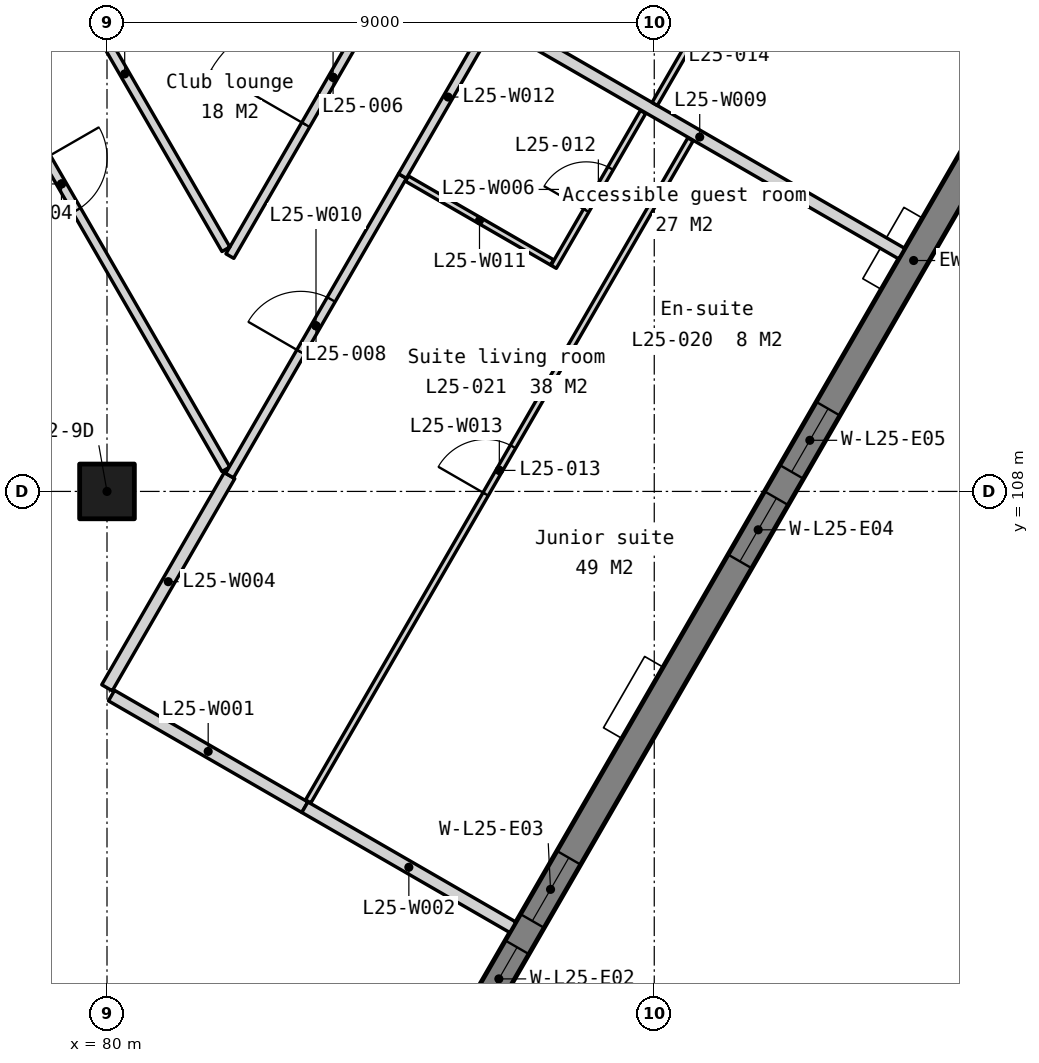
"""IFC4 building model, lengths in metres.
Left out: names, types, materials, properties, quantities, classifications, styles, units other than length and angle.
Written with IfcOpenShell. Run it as: python <this file> out.ifc"""

import sys

from ifc_helpers import new_model, si_unit, direction, frame, frame_2d, origin, origin_2d, place, context, subcontext, project, spatial, polyline, rectangle, outline, extrude, element, fill, save


model = new_model("IFC4")
c1 = context("Model", 3, precision=1e-05, world=origin(), true_north=direction((0.0, 1.0)))
c2 = subcontext(c1, "Body", "Model", "MODEL_VIEW")
j1 = project(units=[si_unit("LENGTHUNIT", "METRE"), si_unit("PLANEANGLEUNIT", "RADIAN")], contexts=[c1])
p1 = place(None, origin())
s1 = spatial("IfcSite", under=j1, at=p1, CompositionType="ELEMENT")
p2 = place(p1, origin())
s2 = spatial("IfcBuilding", under=s1, at=p2, CompositionType="ELEMENT")
p3 = place(p2, frame((0.0, 0.0, 102.8)))
s3 = spatial("IfcBuildingStorey", under=s2, at=p3, CompositionType="ELEMENT", Elevation=102.8)
p4 = place(p3, frame((80.0, 108.0, 0.0), z_axis=(0.0, 0.0, 1.0), x_axis=(1.0, 0.0, 0.0)))
e1 = element("IfcColumn", 1, at=p4, inside=s3, PredefinedType="COLUMN", context=c2, shape_type="SweptSolid", body=[
    extrude(rectangle(XDim=0.9, YDim=0.9, at=origin_2d()), origin(), (0.0, 0.0, 1.0), 3.5),
])
p5 = place(p3, frame((82.605, 93.333, -0.15), z_axis=(0.0, 0.0, 1.0), x_axis=(0.500000478905, 0.866025127289, 0.0)))
e2 = element("IfcWall", 2, at=p5, inside=s3, PredefinedType="SOLIDWALL", context=c2, shape_type="SweptSolid", body=[
    extrude(outline(polyline([(42.643, 0.0), (42.643, 3.5), (0.0, 3.5), (0.0, 0.0), (42.643, 0.0)])), frame((0.0, 0.225, 0.0), z_axis=(0.0, -1.0, 0.0), x_axis=(1.0, 0.0, 0.0)), (0.0, 0.0, 1.0), 0.45),
])
p6 = place(p5, frame((0.72, 0.0, 1.05)))
e3 = element("IfcOpeningElement", 3, at=p6, cuts=e2, PredefinedType="OPENING", context=c2, shape_type="SweptSolid", body=[
    extrude(rectangle(XDim=1.2, YDim=1.5, at=frame_2d((0.6, 0.75))), frame((0.0, 0.235, 0.0), z_axis=(0.0, -1.0, 0.0), x_axis=(1.0, 0.0, 0.0)), (0.0, 0.0, 1.0), 0.47),
])
p7 = place(p5, frame((7.079, 0.0, 1.05)))
e4 = element("IfcOpeningElement", 4, at=p7, cuts=e2, PredefinedType="OPENING", context=c2, shape_type="SweptSolid", body=[
    extrude(rectangle(XDim=1.2, YDim=1.5, at=frame_2d((0.6, 0.75))), frame((0.0, 0.235, 0.0), z_axis=(0.0, -1.0, 0.0), x_axis=(1.0, 0.0, 0.0)), (0.0, 0.0, 1.0), 0.47),
])
p8 = place(p5, frame((8.779, 0.0, 1.05)))
e5 = element("IfcOpeningElement", 5, at=p8, cuts=e2, PredefinedType="OPENING", context=c2, shape_type="SweptSolid", body=[
    extrude(rectangle(XDim=1.2, YDim=1.5, at=frame_2d((0.6, 0.75))), frame((0.0, 0.235, 0.0), z_axis=(0.0, -1.0, 0.0), x_axis=(1.0, 0.0, 0.0)), (0.0, 0.0, 1.0), 0.47),
])
p9 = place(p5, frame((15.607, 0.0, 1.05)))
e6 = element("IfcOpeningElement", 6, at=p9, cuts=e2, PredefinedType="OPENING", context=c2, shape_type="SweptSolid", body=[
    extrude(rectangle(XDim=1.2, YDim=1.5, at=frame_2d((0.6, 0.75))), frame((0.0, 0.235, 0.0), z_axis=(0.0, -1.0, 0.0), x_axis=(1.0, 0.0, 0.0)), (0.0, 0.0, 1.0), 0.47),
])
p10 = place(p5, frame((17.307, 0.0, 1.05)))
e7 = element("IfcOpeningElement", 7, at=p10, cuts=e2, PredefinedType="OPENING", context=c2, shape_type="SweptSolid", body=[
    extrude(rectangle(XDim=1.2, YDim=1.5, at=frame_2d((0.6, 0.75))), frame((0.0, 0.235, 0.0), z_axis=(0.0, -1.0, 0.0), x_axis=(1.0, 0.0, 0.0)), (0.0, 0.0, 1.0), 0.47),
])
p11 = place(p5, frame((24.136, 0.0, 1.05)))
e8 = element("IfcOpeningElement", 8, at=p11, cuts=e2, PredefinedType="OPENING", context=c2, shape_type="SweptSolid", body=[
    extrude(rectangle(XDim=1.2, YDim=1.5, at=frame_2d((0.6, 0.75))), frame((0.0, 0.235, 0.0), z_axis=(0.0, -1.0, 0.0), x_axis=(1.0, 0.0, 0.0)), (0.0, 0.0, 1.0), 0.47),
])
p12 = place(p5, frame((25.836, 0.0, 1.05)))
e9 = element("IfcOpeningElement", 9, at=p12, cuts=e2, PredefinedType="OPENING", context=c2, shape_type="SweptSolid", body=[
    extrude(rectangle(XDim=1.2, YDim=1.5, at=frame_2d((0.6, 0.75))), frame((0.0, 0.235, 0.0), z_axis=(0.0, -1.0, 0.0), x_axis=(1.0, 0.0, 0.0)), (0.0, 0.0, 1.0), 0.47),
])
p13 = place(p5, frame((32.665, 0.0, 1.05)))
e10 = element("IfcOpeningElement", 10, at=p13, cuts=e2, PredefinedType="OPENING", context=c2, shape_type="SweptSolid", body=[
    extrude(rectangle(XDim=1.2, YDim=1.5, at=frame_2d((0.6, 0.75))), frame((0.0, 0.235, 0.0), z_axis=(0.0, -1.0, 0.0), x_axis=(1.0, 0.0, 0.0)), (0.0, 0.0, 1.0), 0.47),
])
p14 = place(p5, frame((34.365, 0.0, 1.05)))
e11 = element("IfcOpeningElement", 11, at=p14, cuts=e2, PredefinedType="OPENING", context=c2, shape_type="SweptSolid", body=[
    extrude(rectangle(XDim=1.2, YDim=1.5, at=frame_2d((0.6, 0.75))), frame((0.0, 0.235, 0.0), z_axis=(0.0, -1.0, 0.0), x_axis=(1.0, 0.0, 0.0)), (0.0, 0.0, 1.0), 0.47),
])
p15 = place(p5, frame((40.722, 0.0, 1.05)))
e12 = element("IfcOpeningElement", 12, at=p15, cuts=e2, PredefinedType="OPENING", context=c2, shape_type="SweptSolid", body=[
    extrude(rectangle(XDim=1.2, YDim=1.5, at=frame_2d((0.6, 0.75))), frame((0.0, 0.235, 0.0), z_axis=(0.0, -1.0, 0.0), x_axis=(1.0, 0.0, 0.0)), (0.0, 0.0, 1.0), 0.47),
])
p16 = place(p3, frame((80.074, 104.642, 0.0), z_axis=(0.0, 0.0, 1.0), x_axis=(0.866008413041, -0.500029427677, 0.0)))
e13 = element("IfcWall", 13, at=p16, inside=s3, PredefinedType="PARTITIONING", context=c2, shape_type="SweptSolid", body=[
    extrude(rectangle(XDim=3.672, YDim=0.2, at=frame_2d((1.836, 0.0))), origin(), (0.0, 0.0, 1.0), 3.35),
])
p17 = place(p3, frame((83.254, 102.806, 0.0), z_axis=(0.0, 0.0, 1.0), x_axis=(0.866032218625, -0.499988196164, 0.0)))
e14 = element("IfcWall", 14, at=p17, inside=s3, PredefinedType="PARTITIONING", context=c2, shape_type="SweptSolid", body=[
    extrude(rectangle(XDim=3.95, YDim=0.2, at=frame_2d((1.975, 0.0))), origin(), (0.0, 0.0, 1.0), 3.35),
])
p18 = place(p3, frame((80.0, 104.771, 0.0), z_axis=(0.0, 0.0, 1.0), x_axis=(0.499989908473, 0.866031230052, 0.0)))
e15 = element("IfcWall", 15, at=p18, inside=s3, PredefinedType="PARTITIONING", context=c2, shape_type="SweptSolid", body=[
    extrude(rectangle(XDim=4.03, YDim=0.2, at=frame_2d((2.015, 0.0))), origin(), (0.0, 0.0, 1.0), 3.35),
])
p19 = place(p3, frame((76.548, 117.75, 0.0), z_axis=(0.0, 0.0, 1.0), x_axis=(0.499203981413, -0.866484497808, 0.0)))
e16 = element("IfcWall", 16, at=p19, inside=s3, PredefinedType="PARTITIONING", context=c2, shape_type="SweptSolid", body=[
    extrude(rectangle(XDim=10.832, YDim=0.15, at=frame_2d((5.416, 0.0))), origin(), (0.0, 0.0, 1.0), 3.35),
])
p20 = place(p19, frame((4.916, 0.0, 0.0)))
e17 = element("IfcOpeningElement", 17, at=p20, cuts=e16, PredefinedType="OPENING", context=c2, shape_type="SweptSolid", body=[
    extrude(rectangle(XDim=1.0, YDim=2.1, at=frame_2d((0.5, 1.05))), frame((0.0, 0.085, 0.0), z_axis=(0.0, -1.0, 0.0), x_axis=(1.0, 0.0, 0.0)), (0.0, 0.0, 1.0), 0.17),
])
p21 = place(p3, frame((87.346, 111.694, 0.0), z_axis=(0.0, 0.0, 1.0), x_axis=(0.499988418424, 0.866032090307, 0.0)))
e18 = element("IfcWall", 18, at=p21, inside=s3, PredefinedType="PARTITIONING", context=c2, shape_type="SweptSolid", body=[
    extrude(rectangle(XDim=2.94, YDim=0.1, at=frame_2d((1.47, 0.0))), origin(), (0.0, 0.0, 1.0), 3.35),
])
p22 = place(p21, frame((1.07, 0.0, 0.0)))
e19 = element("IfcOpeningElement", 19, at=p22, cuts=e18, PredefinedType="OPENING", context=c2, shape_type="SweptSolid", body=[
    extrude(rectangle(XDim=0.8, YDim=2.1, at=frame_2d((0.4, 1.05))), frame((0.0, 0.06, 0.0), z_axis=(0.0, -1.0, 0.0), x_axis=(1.0, 0.0, 0.0)), (0.0, 0.0, 1.0), 0.12),
])
p23 = place(p3, frame((82.021, 111.871, 0.0), z_axis=(0.0, 0.0, 1.0), x_axis=(0.500006764785, 0.866021498099, 0.0)))
e20 = element("IfcWall", 20, at=p23, inside=s3, PredefinedType="PARTITIONING", context=c2, shape_type="SweptSolid", body=[
    extrude(rectangle(XDim=6.789, YDim=0.15, at=frame_2d((3.395, 0.0))), origin(), (0.0, 0.0, 1.0), 3.35),
])
p24 = place(p23, frame((2.495, 0.0, 0.0)))
e21 = element("IfcOpeningElement", 21, at=p24, cuts=e20, PredefinedType="OPENING", context=c2, shape_type="SweptSolid", body=[
    extrude(rectangle(XDim=1.8, YDim=2.1, at=frame_2d((0.9, 1.05))), frame((0.0, 0.085, 0.0), z_axis=(0.0, -1.0, 0.0), x_axis=(1.0, 0.0, 0.0)), (0.0, 0.0, 1.0), 0.17),
])
p25 = place(p3, frame((86.424, 115.748, 0.0), z_axis=(0.0, 0.0, 1.0), x_axis=(0.866016603171, -0.5000152428, 0.0)))
e22 = element("IfcWall", 22, at=p25, inside=s3, PredefinedType="PARTITIONING", context=c2, shape_type="SweptSolid", body=[
    extrude(rectangle(XDim=7.675, YDim=0.2, at=frame_2d((3.837, 0.0))), origin(), (0.0, 0.0, 1.0), 3.35),
])
p26 = place(p3, frame((82.015, 108.26, 0.0), z_axis=(0.0, 0.0, 1.0), x_axis=(0.500002303494, 0.866024073857, 0.0)))
e23 = element("IfcWall", 23, at=p26, inside=s3, PredefinedType="PARTITIONING", context=c2, shape_type="SweptSolid", body=[
    extrude(rectangle(XDim=5.689, YDim=0.15, at=frame_2d((2.844, 0.0))), origin(), (0.0, 0.0, 1.0), 3.35),
])
p27 = place(p26, frame((2.344, 0.0, 0.0)))
e24 = element("IfcOpeningElement", 24, at=p27, cuts=e23, PredefinedType="OPENING", context=c2, shape_type="SweptSolid", body=[
    extrude(rectangle(XDim=1.0, YDim=2.1, at=frame_2d((0.5, 1.05))), frame((0.0, 0.085, 0.0), z_axis=(0.0, -1.0, 0.0), x_axis=(1.0, 0.0, 0.0)), (0.0, 0.0, 1.0), 0.17),
])
p28 = place(p3, frame((84.933, 113.145, 0.0), z_axis=(0.0, 0.0, 1.0), x_axis=(0.866004076171, -0.500036938691, 0.0)))
e25 = element("IfcWall", 25, at=p28, inside=s3, PredefinedType="PARTITIONING", context=c2, shape_type="SweptSolid", body=[
    extrude(rectangle(XDim=2.755, YDim=0.1, at=frame_2d((1.377, 0.0))), origin(), (0.0, 0.0, 1.0), 3.35),
])
p29 = place(p3, frame((84.859, 113.187, 0.0), z_axis=(0.0, 0.0, 1.0), x_axis=(0.50002537861, 0.866010750942, 0.0)))
e26 = element("IfcWall", 26, at=p29, inside=s3, PredefinedType="PARTITIONING", context=c2, shape_type="SweptSolid", body=[
    extrude(rectangle(XDim=3.0, YDim=0.15, at=frame_2d((1.5, 0.0))), origin(), (0.0, 0.0, 1.0), 3.35),
])
p30 = place(p3, frame((83.309, 102.902, 0.0), z_axis=(0.0, 0.0, 1.0), x_axis=(0.499996436937, 0.86602746091, 0.0)))
e27 = element("IfcWall", 27, at=p30, inside=s3, PredefinedType="PARTITIONING", context=c2, shape_type="SweptSolid", body=[
    extrude(rectangle(XDim=12.573, YDim=0.1, at=frame_2d((6.286, 0.0))), origin(), (0.0, 0.0, 1.0), 3.35),
])
p31 = place(p30, frame((5.836, 0.0, 0.0)))
e28 = element("IfcOpeningElement", 28, at=p31, cuts=e27, PredefinedType="OPENING", context=c2, shape_type="SweptSolid", body=[
    extrude(rectangle(XDim=0.9, YDim=2.1, at=frame_2d((0.45, 1.05))), frame((0.0, 0.06, 0.0), z_axis=(0.0, -1.0, 0.0), x_axis=(1.0, 0.0, 0.0)), (0.0, 0.0, 1.0), 0.12),
])
p32 = place(p3, frame((89.007, 114.372, 0.0), z_axis=(0.0, 0.0, 1.0), x_axis=(0.500001826776, 0.866024349092, 0.0)))
e29 = element("IfcWall", 29, at=p32, inside=s3, PredefinedType="PARTITIONING", context=c2, shape_type="SweptSolid", body=[
    extrude(rectangle(XDim=2.95, YDim=0.1, at=frame_2d((1.475, 0.0))), origin(), (0.0, 0.0, 1.0), 3.35),
])
p33 = place(p32, frame((1.075, 0.0, 0.0)))
e30 = element("IfcOpeningElement", 30, at=p33, cuts=e29, PredefinedType="OPENING", context=c2, shape_type="SweptSolid", body=[
    extrude(rectangle(XDim=0.8, YDim=2.1, at=frame_2d((0.4, 1.05))), frame((0.0, 0.06, 0.0), z_axis=(0.0, -1.0, 0.0), x_axis=(1.0, 0.0, 0.0)), (0.0, 0.0, 1.0), 0.12),
])
p34 = place(p3, frame((78.626, 117.75, 0.0), z_axis=(0.0, 0.0, 1.0), x_axis=(0.499995378973, -0.866028071719, 0.0)))
e31 = element("IfcWall", 31, at=p34, inside=s3, PredefinedType="PARTITIONING", context=c2, shape_type="SweptSolid", body=[
    extrude(rectangle(XDim=6.659, YDim=0.15, at=frame_2d((3.33, 0.0))), origin(), (0.0, 0.0, 1.0), 3.35),
])
p35 = place(p7, origin())
e32 = element("IfcWindow", 32, at=p35, inside=s3, PartitioningType="SINGLE_PANEL", PredefinedType="WINDOW", context=c2, shape_type="SweptSolid", body=[
    extrude(rectangle(XDim=1.2, YDim=1.5, at=frame_2d((0.6, 0.75))), frame((0.0, 0.03, 0.0), z_axis=(0.0, -1.0, 0.0), x_axis=(1.0, 0.0, 0.0)), (0.0, 0.0, 1.0), 0.06),
])
fill(e4, e32)
p36 = place(p8, origin())
e33 = element("IfcWindow", 33, at=p36, inside=s3, PartitioningType="SINGLE_PANEL", PredefinedType="WINDOW", context=c2, shape_type="SweptSolid", body=[
    extrude(rectangle(XDim=1.2, YDim=1.5, at=frame_2d((0.6, 0.75))), frame((0.0, 0.03, 0.0), z_axis=(0.0, -1.0, 0.0), x_axis=(1.0, 0.0, 0.0)), (0.0, 0.0, 1.0), 0.06),
])
fill(e5, e33)
p37 = place(p9, origin())
e34 = element("IfcWindow", 34, at=p37, inside=s3, PartitioningType="SINGLE_PANEL", PredefinedType="WINDOW", context=c2, shape_type="SweptSolid", body=[
    extrude(rectangle(XDim=1.2, YDim=1.5, at=frame_2d((0.6, 0.75))), frame((0.0, 0.03, 0.0), z_axis=(0.0, -1.0, 0.0), x_axis=(1.0, 0.0, 0.0)), (0.0, 0.0, 1.0), 0.06),
])
fill(e6, e34)
p38 = place(p10, origin())
e35 = element("IfcWindow", 35, at=p38, inside=s3, PartitioningType="SINGLE_PANEL", PredefinedType="WINDOW", context=c2, shape_type="SweptSolid", body=[
    extrude(rectangle(XDim=1.2, YDim=1.5, at=frame_2d((0.6, 0.75))), frame((0.0, 0.03, 0.0), z_axis=(0.0, -1.0, 0.0), x_axis=(1.0, 0.0, 0.0)), (0.0, 0.0, 1.0), 0.06),
])
fill(e7, e35)
p39 = place(p20, origin())
e36 = element("IfcDoor", 36, at=p39, inside=s3, OperationType="SINGLE_SWING_LEFT", PredefinedType="DOOR", context=c2, shape_type="SweptSolid", body=[
    extrude(rectangle(XDim=1.0, YDim=2.1, at=frame_2d((0.5, 1.05))), frame((0.0, 0.025, 0.0), z_axis=(0.0, -1.0, 0.0), x_axis=(1.0, 0.0, 0.0)), (0.0, 0.0, 1.0), 0.05),
])
fill(e17, e36)
p40 = place(p24, origin())
e37 = element("IfcDoor", 37, at=p40, inside=s3, OperationType="SINGLE_SWING_LEFT", PredefinedType="DOOR", context=c2, shape_type="SweptSolid", body=[
    extrude(rectangle(XDim=1.8, YDim=2.1, at=frame_2d((0.9, 1.05))), frame((0.0, 0.025, 0.0), z_axis=(0.0, -1.0, 0.0), x_axis=(1.0, 0.0, 0.0)), (0.0, 0.0, 1.0), 0.05),
])
fill(e21, e37)
p41 = place(p27, origin())
e38 = element("IfcDoor", 38, at=p41, inside=s3, OperationType="SINGLE_SWING_LEFT", PredefinedType="DOOR", context=c2, shape_type="SweptSolid", body=[
    extrude(rectangle(XDim=1.0, YDim=2.1, at=frame_2d((0.5, 1.05))), frame((0.0, 0.025, 0.0), z_axis=(0.0, -1.0, 0.0), x_axis=(1.0, 0.0, 0.0)), (0.0, 0.0, 1.0), 0.05),
])
fill(e24, e38)
p42 = place(p22, origin())
e39 = element("IfcDoor", 39, at=p42, inside=s3, OperationType="SINGLE_SWING_LEFT", PredefinedType="DOOR", context=c2, shape_type="SweptSolid", body=[
    extrude(rectangle(XDim=0.8, YDim=2.1, at=frame_2d((0.4, 1.05))), frame((0.0, 0.025, 0.0), z_axis=(0.0, -1.0, 0.0), x_axis=(1.0, 0.0, 0.0)), (0.0, 0.0, 1.0), 0.05),
])
fill(e19, e39)
p43 = place(p31, origin())
e40 = element("IfcDoor", 40, at=p43, inside=s3, OperationType="SINGLE_SWING_LEFT", PredefinedType="DOOR", context=c2, shape_type="SweptSolid", body=[
    extrude(rectangle(XDim=0.9, YDim=2.1, at=frame_2d((0.45, 1.05))), frame((0.0, 0.025, 0.0), z_axis=(0.0, -1.0, 0.0), x_axis=(1.0, 0.0, 0.0)), (0.0, 0.0, 1.0), 0.05),
])
fill(e28, e40)
save(model, sys.argv[1])
